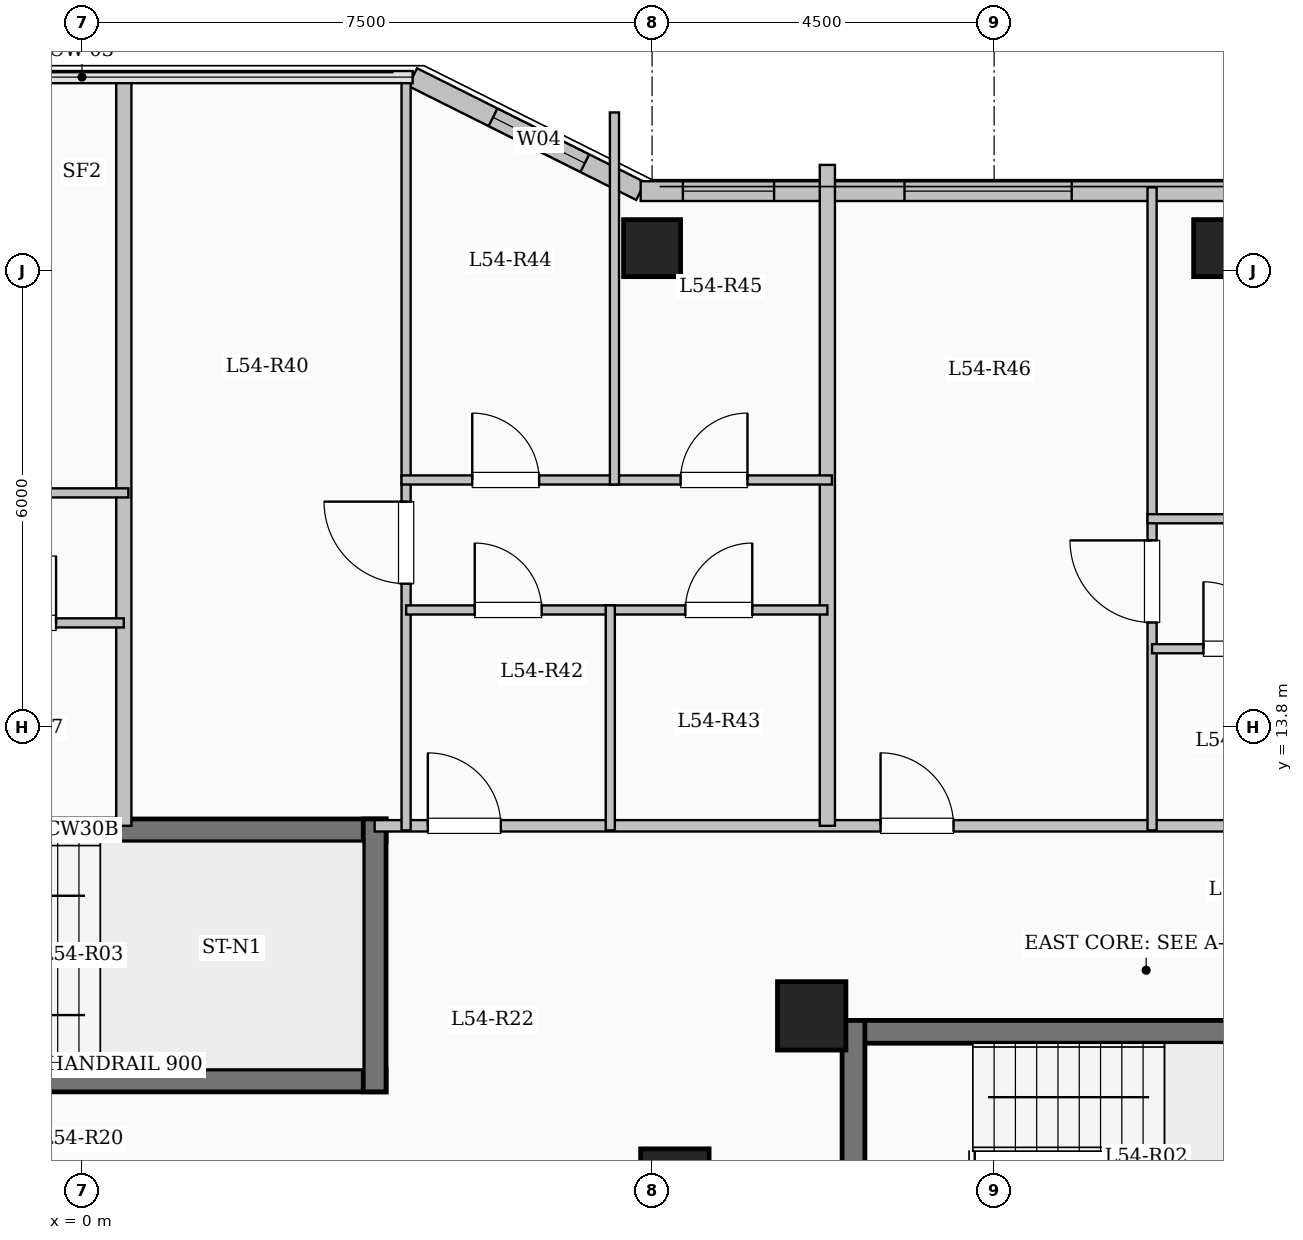
"""IFC4 building model, lengths in metres.
Left out: names, types, materials, properties, quantities, classifications, styles, units other than length and angle.
Written with IfcOpenShell. Run it as: python <this file> out.ifc"""

import sys

from ifc_helpers import new_model, si_unit, direction, frame, frame_2d, origin, origin_2d, place, context, subcontext, project, spatial, rectangle, extrude, element, fill, save


model = new_model("IFC4")
c1 = context("Model", 3, precision=1e-05, world=origin(), true_north=direction((0.0, 1.0)))
c2 = subcontext(c1, "Body", "Model", "MODEL_VIEW")
j1 = project(units=[si_unit("LENGTHUNIT", "METRE"), si_unit("PLANEANGLEUNIT", "RADIAN")], contexts=[c1])
p1 = place(None, origin())
s1 = spatial("IfcSite", under=j1, at=p1, CompositionType="ELEMENT")
p2 = place(p1, origin())
s2 = spatial("IfcBuilding", under=s1, at=p2, CompositionType="ELEMENT")
p3 = place(p2, frame((0.0, 0.0, 200.3)))
s3 = spatial("IfcBuildingStorey", under=s2, at=p3, CompositionType="ELEMENT", Elevation=200.3)
for number, where, z_axis, x_axis in (
    (1, (7.8, 7.8, 0.0), (0.0, 0.0, 1.0), (1.0, 0.0, 0.0)),
    (2, (9.6, 10.0, 0.0), (0.0, 0.0, 1.0), (1.0, 0.0, 0.0)),
):
    element("IfcColumn", number, at=place(p3, frame(where, z_axis=z_axis, x_axis=x_axis)), inside=s3, PredefinedType="COLUMN", context=c2, shape_type="SweptSolid", body=[
        extrude(rectangle(XDim=0.9, YDim=0.9, at=origin_2d()), origin(), (0.0, 0.0, 1.0), 3.35),
    ])
for number, where, z_axis, x_axis in (
    (3, (7.5, 20.1, 0.0), (0.0, 0.0, 1.0), (1.0, 0.0, 0.0)),
    (4, (15.0, 20.1, 0.0), (0.0, 0.0, 1.0), (1.0, 0.0, 0.0)),
):
    element("IfcColumn", number, at=place(p3, frame(where, z_axis=z_axis, x_axis=x_axis)), inside=s3, PredefinedType="COLUMN", context=c2, shape_type="SweptSolid", body=[
        extrude(rectangle(XDim=0.75, YDim=0.75, at=origin_2d()), origin(), (0.0, 0.0, 1.0), 3.35),
    ])
p4 = place(p3, frame((4.35, 22.35, 0.0), z_axis=(0.0, 0.0, 1.0), x_axis=(0.894427191, -0.4472135955, 0.0)))
e5 = element("IfcWall", 5, at=p4, inside=s3, PredefinedType="SOLIDWALL", context=c2, shape_type="SweptSolid", body=[
    extrude(rectangle(XDim=3.354, YDim=0.26, at=frame_2d((1.677, 0.0))), origin(), (0.0, 0.0, 1.0), 3.1),
])
p5 = place(p4, frame((1.182, 0.0, 0.95)))
e6 = element("IfcOpeningElement", 6, at=p5, cuts=e5, PredefinedType="OPENING", context=c2, shape_type="SweptSolid", body=[
    extrude(rectangle(XDim=1.35, YDim=1.55, at=frame_2d((0.675, 0.775))), frame((0.0, 0.14, 0.0), z_axis=(0.0, -1.0, 0.0), x_axis=(1.0, 0.0, 0.0)), (0.0, 0.0, 1.0), 0.28),
])
p6 = place(p3, frame((7.35, 20.85, 0.0), z_axis=(0.0, 0.0, 1.0), x_axis=(1.0, 0.0, 0.0)))
e7 = element("IfcWall", 7, at=p6, inside=s3, PredefinedType="SOLIDWALL", context=c2, shape_type="SweptSolid", body=[
    extrude(rectangle(XDim=11.1, YDim=0.26, at=frame_2d((5.55, 0.0))), origin(), (0.0, 0.0, 1.0), 3.1),
])
p7 = place(p6, frame((0.555, 0.0, 0.95)))
e8 = element("IfcOpeningElement", 8, at=p7, cuts=e7, PredefinedType="OPENING", context=c2, shape_type="SweptSolid", body=[
    extrude(rectangle(XDim=1.2, YDim=1.5, at=frame_2d((0.6, 0.75))), frame((0.0, 0.14, 0.0), z_axis=(0.0, -1.0, 0.0), x_axis=(1.0, 0.0, 0.0)), (0.0, 0.0, 1.0), 0.28),
])
p8 = place(p6, frame((3.471, 0.0, 0.9)))
e9 = element("IfcOpeningElement", 9, at=p8, cuts=e7, PredefinedType="OPENING", context=c2, shape_type="SweptSolid", body=[
    extrude(rectangle(XDim=2.2, YDim=1.75, at=frame_2d((1.1, 0.875))), frame((0.0, 0.14, 0.0), z_axis=(0.0, -1.0, 0.0), x_axis=(1.0, 0.0, 0.0)), (0.0, 0.0, 1.0), 0.28),
])
p9 = place(p6, frame((8.04, 0.0, 0.9)))
e10 = element("IfcOpeningElement", 10, at=p9, cuts=e7, PredefinedType="OPENING", context=c2, shape_type="SweptSolid", body=[
    extrude(rectangle(XDim=1.65, YDim=1.6, at=frame_2d((0.825, 0.8))), frame((0.0, 0.14, 0.0), z_axis=(0.0, -1.0, 0.0), x_axis=(1.0, 0.0, 0.0)), (0.0, 0.0, 1.0), 0.28),
])
p10 = place(p3, frame((10.0, 9.79, 0.0), z_axis=(0.0, 0.0, 1.0), x_axis=(1.0, 0.0, 0.0)))
e11 = element("IfcWall", 11, at=p10, inside=s3, PredefinedType="SHEAR", context=c2, shape_type="SweptSolid", body=[
    extrude(rectangle(XDim=8.0, YDim=0.3, at=frame_2d((4.0, 0.0))), origin(), (0.0, 0.0, 1.0), 3.35),
])
p11 = place(p3, frame((10.15, 6.35, 0.0), z_axis=(0.0, 0.0, 1.0), x_axis=(0.0, 1.0, 0.0)))
e12 = element("IfcWall", 12, at=p11, inside=s3, PredefinedType="SHEAR", context=c2, shape_type="SweptSolid", body=[
    extrude(rectangle(XDim=3.59, YDim=0.3, at=frame_2d((1.795, 0.0))), origin(), (0.0, 0.0, 1.0), 3.35),
])
p12 = place(p3, frame((-4.0, 12.44, 0.0), z_axis=(0.0, 0.0, 1.0), x_axis=(1.0, 0.0, 0.0)))
e13 = element("IfcWall", 13, at=p12, inside=s3, PredefinedType="SHEAR", context=c2, shape_type="SweptSolid", body=[
    extrude(rectangle(XDim=8.0, YDim=0.3, at=frame_2d((4.0, 0.0))), origin(), (0.0, 0.0, 1.0), 3.35),
])
p13 = place(p3, frame((-4.0, 9.15, 0.0), z_axis=(0.0, 0.0, 1.0), x_axis=(1.0, 0.0, 0.0)))
e14 = element("IfcWall", 14, at=p13, inside=s3, PredefinedType="SHEAR", context=c2, shape_type="SweptSolid", body=[
    extrude(rectangle(XDim=8.0, YDim=0.3, at=frame_2d((4.0, 0.0))), origin(), (0.0, 0.0, 1.0), 3.35),
])
p14 = place(p13, frame((0.55, 0.0, 0.0)))
e15 = element("IfcOpeningElement", 15, at=p14, cuts=e14, PredefinedType="OPENING", context=c2, shape_type="SweptSolid", body=[
    extrude(rectangle(XDim=1.0, YDim=2.15, at=frame_2d((0.5, 1.075))), frame((0.0, 0.16, 0.0), z_axis=(0.0, -1.0, 0.0), x_axis=(1.0, 0.0, 0.0)), (0.0, 0.0, 1.0), 0.32),
])
p15 = place(p3, frame((3.85, 9.0, 0.0), z_axis=(0.0, 0.0, 1.0), x_axis=(0.0, 1.0, 0.0)))
e16 = element("IfcWall", 16, at=p15, inside=s3, PredefinedType="SHEAR", context=c2, shape_type="SweptSolid", body=[
    extrude(rectangle(XDim=3.59, YDim=0.3, at=frame_2d((1.795, 0.0))), origin(), (0.0, 0.0, 1.0), 3.35),
])
p16 = place(p3, frame((3.85, 12.5, 0.0), z_axis=(0.0, 0.0, 1.0), x_axis=(1.0, 0.0, 0.0)))
e17 = element("IfcWall", 17, at=p16, inside=s3, PredefinedType="PARTITIONING", context=c2, shape_type="SweptSolid", body=[
    extrude(rectangle(XDim=14.5, YDim=0.15, at=frame_2d((7.25, 0.0))), origin(), (0.0, 0.0, 1.0), 3.1),
])
p17 = place(p16, frame((0.7, 0.0, 0.0)))
e18 = element("IfcOpeningElement", 18, at=p17, cuts=e17, PredefinedType="OPENING", context=c2, shape_type="SweptSolid", body=[
    extrude(rectangle(XDim=0.96, YDim=2.15, at=frame_2d((0.48, 1.075))), frame((0.0, 0.085, 0.0), z_axis=(0.0, -1.0, 0.0), x_axis=(1.0, 0.0, 0.0)), (0.0, 0.0, 1.0), 0.17),
])
p18 = place(p16, frame((6.656, 0.0, 0.0)))
e19 = element("IfcOpeningElement", 19, at=p18, cuts=e17, PredefinedType="OPENING", context=c2, shape_type="SweptSolid", body=[
    extrude(rectangle(XDim=0.96, YDim=2.15, at=frame_2d((0.48, 1.075))), frame((0.0, 0.085, 0.0), z_axis=(0.0, -1.0, 0.0), x_axis=(1.0, 0.0, 0.0)), (0.0, 0.0, 1.0), 0.17),
])
p19 = place(p3, frame((0.55, 12.5, 0.0), z_axis=(0.0, 0.0, 1.0), x_axis=(0.0, 1.0, 0.0)))
e20 = element("IfcWall", 20, at=p19, inside=s3, PredefinedType="SOLIDWALL", context=c2, shape_type="SweptSolid", body=[
    extrude(rectangle(XDim=9.88, YDim=0.2, at=frame_2d((4.94, 0.0))), origin(), (0.0, 0.0, 1.0), 3.1),
])
p20 = place(p3, frame((-2.112, 15.17, 0.0), z_axis=(0.0, 0.0, 1.0), x_axis=(1.0, 0.0, 0.0)))
e21 = element("IfcWall", 21, at=p20, inside=s3, PredefinedType="PARTITIONING", context=c2, shape_type="SweptSolid", body=[
    extrude(rectangle(XDim=2.662, YDim=0.12, at=frame_2d((1.331, 0.0))), origin(), (0.0, 0.0, 1.0), 3.1),
])
p21 = place(p20, frame((0.891, 0.0, 0.0)))
e22 = element("IfcOpeningElement", 22, at=p21, cuts=e21, PredefinedType="OPENING", context=c2, shape_type="SweptSolid", body=[
    extrude(rectangle(XDim=0.88, YDim=2.1, at=frame_2d((0.44, 1.05))), frame((0.0, 0.07, 0.0), z_axis=(0.0, -1.0, 0.0), x_axis=(1.0, 0.0, 0.0)), (0.0, 0.0, 1.0), 0.14),
])
p22 = place(p3, frame((-5.622, 16.88, 0.0), z_axis=(0.0, 0.0, 1.0), x_axis=(1.0, 0.0, 0.0)))
e23 = element("IfcWall", 23, at=p22, inside=s3, PredefinedType="PARTITIONING", context=c2, shape_type="SweptSolid", body=[
    extrude(rectangle(XDim=6.232, YDim=0.12, at=frame_2d((3.116, 0.0))), origin(), (0.0, 0.0, 1.0), 2.725),
])
p23 = place(p22, frame((1.073, 0.0, 0.0)))
e24 = element("IfcOpeningElement", 24, at=p23, cuts=e23, PredefinedType="OPENING", context=c2, shape_type="SweptSolid", body=[
    extrude(rectangle(XDim=0.88, YDim=2.1, at=frame_2d((0.44, 1.05))), frame((0.0, 0.07, 0.0), z_axis=(0.0, -1.0, 0.0), x_axis=(1.0, 0.0, 0.0)), (0.0, 0.0, 1.0), 0.14),
])
p24 = place(p22, frame((4.099, 0.0, 0.0)))
e25 = element("IfcOpeningElement", 25, at=p24, cuts=e23, PredefinedType="OPENING", context=c2, shape_type="SweptSolid", body=[
    extrude(rectangle(XDim=0.88, YDim=2.1, at=frame_2d((0.44, 1.05))), frame((0.0, 0.07, 0.0), z_axis=(0.0, -1.0, 0.0), x_axis=(1.0, 0.0, 0.0)), (0.0, 0.0, 1.0), 0.14),
])
p25 = place(p3, frame((9.806, 12.5, 0.0), z_axis=(0.0, 0.0, 1.0), x_axis=(0.0, 1.0, 0.0)))
e26 = element("IfcWall", 26, at=p25, inside=s3, PredefinedType="SOLIDWALL", context=c2, shape_type="SweptSolid", body=[
    extrude(rectangle(XDim=8.695, YDim=0.2, at=frame_2d((4.348, 0.0))), origin(), (0.0, 0.0, 1.0), 3.1),
])
p26 = place(p3, frame((4.264, 12.44, 0.0), z_axis=(0.0, 0.0, 1.0), x_axis=(0.0, 1.0, 0.0)))
e27 = element("IfcWall", 27, at=p26, inside=s3, PredefinedType="PARTITIONING", context=c2, shape_type="SweptSolid", body=[
    extrude(rectangle(XDim=9.94, YDim=0.12, at=frame_2d((4.97, 0.0))), origin(), (0.0, 0.0, 1.0), 3.1),
])
p27 = place(p26, frame((3.245, 0.0, 0.0)))
e28 = element("IfcOpeningElement", 28, at=p27, cuts=e27, PredefinedType="OPENING", context=c2, shape_type="SweptSolid", body=[
    extrude(rectangle(XDim=1.08, YDim=2.15, at=frame_2d((0.54, 1.075))), frame((0.0, 0.07, 0.0), z_axis=(0.0, -1.0, 0.0), x_axis=(1.0, 0.0, 0.0)), (0.0, 0.0, 1.0), 0.14),
])
p28 = place(p3, frame((4.264, 15.34, 0.0), z_axis=(0.0, 0.0, 1.0), x_axis=(1.0, 0.0, 0.0)))
e29 = element("IfcWall", 29, at=p28, inside=s3, PredefinedType="PARTITIONING", context=c2, shape_type="SweptSolid", body=[
    extrude(rectangle(XDim=2.686, YDim=0.12, at=frame_2d((1.343, 0.0))), origin(), (0.0, 0.0, 1.0), 2.725),
])
p29 = place(p28, frame((0.903, 0.0, 0.0)))
e30 = element("IfcOpeningElement", 30, at=p29, cuts=e29, PredefinedType="OPENING", context=c2, shape_type="SweptSolid", body=[
    extrude(rectangle(XDim=0.88, YDim=2.1, at=frame_2d((0.44, 1.05))), frame((0.0, 0.07, 0.0), z_axis=(0.0, -1.0, 0.0), x_axis=(1.0, 0.0, 0.0)), (0.0, 0.0, 1.0), 0.14),
])
p30 = place(p3, frame((6.95, 15.34, 0.0), z_axis=(0.0, 0.0, 1.0), x_axis=(1.0, 0.0, 0.0)))
e31 = element("IfcWall", 31, at=p30, inside=s3, PredefinedType="PARTITIONING", context=c2, shape_type="SweptSolid", body=[
    extrude(rectangle(XDim=2.856, YDim=0.12, at=frame_2d((1.428, 0.0))), origin(), (0.0, 0.0, 1.0), 2.725),
])
p31 = place(p30, frame((0.988, 0.0, 0.0)))
e32 = element("IfcOpeningElement", 32, at=p31, cuts=e31, PredefinedType="OPENING", context=c2, shape_type="SweptSolid", body=[
    extrude(rectangle(XDim=0.88, YDim=2.1, at=frame_2d((0.44, 1.05))), frame((0.0, 0.07, 0.0), z_axis=(0.0, -1.0, 0.0), x_axis=(1.0, 0.0, 0.0)), (0.0, 0.0, 1.0), 0.14),
])
p32 = place(p3, frame((4.204, 17.05, 0.0), z_axis=(0.0, 0.0, 1.0), x_axis=(1.0, 0.0, 0.0)))
e33 = element("IfcWall", 33, at=p32, inside=s3, PredefinedType="PARTITIONING", context=c2, shape_type="SweptSolid", body=[
    extrude(rectangle(XDim=5.662, YDim=0.12, at=frame_2d((2.831, 0.0))), origin(), (0.0, 0.0, 1.0), 2.725),
])
p33 = place(p32, frame((0.93, 0.0, 0.0)))
e34 = element("IfcOpeningElement", 34, at=p33, cuts=e33, PredefinedType="OPENING", context=c2, shape_type="SweptSolid", body=[
    extrude(rectangle(XDim=0.88, YDim=2.1, at=frame_2d((0.44, 1.05))), frame((0.0, 0.07, 0.0), z_axis=(0.0, -1.0, 0.0), x_axis=(1.0, 0.0, 0.0)), (0.0, 0.0, 1.0), 0.14),
])
p34 = place(p32, frame((3.671, 0.0, 0.0)))
e35 = element("IfcOpeningElement", 35, at=p34, cuts=e33, PredefinedType="OPENING", context=c2, shape_type="SweptSolid", body=[
    extrude(rectangle(XDim=0.88, YDim=2.1, at=frame_2d((0.44, 1.05))), frame((0.0, 0.07, 0.0), z_axis=(0.0, -1.0, 0.0), x_axis=(1.0, 0.0, 0.0)), (0.0, 0.0, 1.0), 0.14),
])
p35 = place(p3, frame((6.95, 12.44, 0.0), z_axis=(0.0, 0.0, 1.0), x_axis=(0.0, 1.0, 0.0)))
e36 = element("IfcWall", 36, at=p35, inside=s3, PredefinedType="PARTITIONING", context=c2, shape_type="SweptSolid", body=[
    extrude(rectangle(XDim=2.96, YDim=0.12, at=frame_2d((1.48, 0.0))), origin(), (0.0, 0.0, 1.0), 3.1),
])
p36 = place(p3, frame((7.005, 16.99, 0.0), z_axis=(0.0, 0.0, 1.0), x_axis=(0.0, 1.0, 0.0)))
e37 = element("IfcWall", 37, at=p36, inside=s3, PredefinedType="PARTITIONING", context=c2, shape_type="SweptSolid", body=[
    extrude(rectangle(XDim=4.895, YDim=0.12, at=frame_2d((2.448, 0.0))), origin(), (0.0, 0.0, 1.0), 3.1),
])
p37 = place(p3, frame((14.078, 12.44, 0.0), z_axis=(0.0, 0.0, 1.0), x_axis=(0.0, 1.0, 0.0)))
e38 = element("IfcWall", 38, at=p37, inside=s3, PredefinedType="PARTITIONING", context=c2, shape_type="SweptSolid", body=[
    extrude(rectangle(XDim=8.46, YDim=0.12, at=frame_2d((4.23, 0.0))), origin(), (0.0, 0.0, 1.0), 3.1),
])
p38 = place(p37, frame((2.735, 0.0, 0.0)))
e39 = element("IfcOpeningElement", 39, at=p38, cuts=e38, PredefinedType="OPENING", context=c2, shape_type="SweptSolid", body=[
    extrude(rectangle(XDim=1.08, YDim=2.15, at=frame_2d((0.54, 1.075))), frame((0.0, 0.07, 0.0), z_axis=(0.0, -1.0, 0.0), x_axis=(1.0, 0.0, 0.0)), (0.0, 0.0, 1.0), 0.14),
])
p39 = place(p3, frame((14.078, 14.83, 0.0), z_axis=(0.0, 0.0, 1.0), x_axis=(1.0, 0.0, 0.0)))
e40 = element("IfcWall", 40, at=p39, inside=s3, PredefinedType="PARTITIONING", context=c2, shape_type="SweptSolid", body=[
    extrude(rectangle(XDim=2.232, YDim=0.12, at=frame_2d((1.116, 0.0))), origin(), (0.0, 0.0, 1.0), 3.1),
])
p40 = place(p39, frame((0.676, 0.0, 0.0)))
e41 = element("IfcOpeningElement", 41, at=p40, cuts=e40, PredefinedType="OPENING", context=c2, shape_type="SweptSolid", body=[
    extrude(rectangle(XDim=0.88, YDim=2.1, at=frame_2d((0.44, 1.05))), frame((0.0, 0.07, 0.0), z_axis=(0.0, -1.0, 0.0), x_axis=(1.0, 0.0, 0.0)), (0.0, 0.0, 1.0), 0.14),
])
p41 = place(p3, frame((14.018, 16.54, 0.0), z_axis=(0.0, 0.0, 1.0), x_axis=(1.0, 0.0, 0.0)))
e42 = element("IfcWall", 42, at=p41, inside=s3, PredefinedType="PARTITIONING", context=c2, shape_type="SweptSolid", body=[
    extrude(rectangle(XDim=4.392, YDim=0.12, at=frame_2d((2.196, 0.0))), origin(), (0.0, 0.0, 1.0), 3.1),
])
p42 = place(p41, frame((1.666, 0.0, 0.0)))
e43 = element("IfcOpeningElement", 43, at=p42, cuts=e42, PredefinedType="OPENING", context=c2, shape_type="SweptSolid", body=[
    extrude(rectangle(XDim=0.88, YDim=2.1, at=frame_2d((0.44, 1.05))), frame((0.0, 0.07, 0.0), z_axis=(0.0, -1.0, 0.0), x_axis=(1.0, 0.0, 0.0)), (0.0, 0.0, 1.0), 0.14),
])
p43 = place(p5, origin())
e44 = element("IfcWindow", 44, at=p43, inside=s3, PartitioningType="SINGLE_PANEL", PredefinedType="WINDOW", context=c2, shape_type="SweptSolid", body=[
    extrude(rectangle(XDim=1.35, YDim=1.55, at=frame_2d((0.675, 0.775))), frame((0.0, 0.03, 0.0), z_axis=(0.0, -1.0, 0.0), x_axis=(1.0, 0.0, 0.0)), (0.0, 0.0, 1.0), 0.06),
])
fill(e6, e44)
p44 = place(p7, origin())
e45 = element("IfcWindow", 45, at=p44, inside=s3, PartitioningType="SINGLE_PANEL", PredefinedType="WINDOW", context=c2, shape_type="SweptSolid", body=[
    extrude(rectangle(XDim=1.2, YDim=1.5, at=frame_2d((0.6, 0.75))), frame((0.0, 0.03, 0.0), z_axis=(0.0, -1.0, 0.0), x_axis=(1.0, 0.0, 0.0)), (0.0, 0.0, 1.0), 0.06),
])
fill(e8, e45)
p45 = place(p8, origin())
e46 = element("IfcWindow", 46, at=p45, inside=s3, PartitioningType="SINGLE_PANEL", PredefinedType="WINDOW", context=c2, shape_type="SweptSolid", body=[
    extrude(rectangle(XDim=2.2, YDim=1.75, at=frame_2d((1.1, 0.875))), frame((0.0, 0.03, 0.0), z_axis=(0.0, -1.0, 0.0), x_axis=(1.0, 0.0, 0.0)), (0.0, 0.0, 1.0), 0.06),
])
fill(e9, e46)
p46 = place(p21, origin())
e47 = element("IfcDoor", 47, at=p46, inside=s3, OperationType="SINGLE_SWING_RIGHT", PredefinedType="DOOR", context=c2, shape_type="SweptSolid", body=[
    extrude(rectangle(XDim=0.88, YDim=2.1, at=frame_2d((0.44, 1.05))), frame((0.0, 0.025, 0.0), z_axis=(0.0, -1.0, 0.0), x_axis=(1.0, 0.0, 0.0)), (0.0, 0.0, 1.0), 0.05),
])
fill(e22, e47)
p47 = place(p17, origin())
e48 = element("IfcDoor", 48, at=p47, inside=s3, OperationType="SINGLE_SWING_LEFT", PredefinedType="DOOR", context=c2, shape_type="SweptSolid", body=[
    extrude(rectangle(XDim=0.96, YDim=2.15, at=frame_2d((0.48, 1.075))), frame((0.0, 0.025, 0.0), z_axis=(0.0, -1.0, 0.0), x_axis=(1.0, 0.0, 0.0)), (0.0, 0.0, 1.0), 0.05),
])
fill(e18, e48)
p48 = place(p27, origin())
e49 = element("IfcDoor", 49, at=p48, inside=s3, OperationType="SINGLE_SWING_RIGHT", PredefinedType="DOOR", context=c2, shape_type="SweptSolid", body=[
    extrude(rectangle(XDim=1.08, YDim=2.15, at=frame_2d((0.54, 1.075))), frame((0.0, 0.025, 0.0), z_axis=(0.0, -1.0, 0.0), x_axis=(1.0, 0.0, 0.0)), (0.0, 0.0, 1.0), 0.05),
])
fill(e28, e49)
p49 = place(p29, origin())
e50 = element("IfcDoor", 50, at=p49, inside=s3, OperationType="SINGLE_SWING_LEFT", PredefinedType="DOOR", context=c2, shape_type="SweptSolid", body=[
    extrude(rectangle(XDim=0.88, YDim=2.1, at=frame_2d((0.44, 1.05))), frame((0.0, 0.025, 0.0), z_axis=(0.0, -1.0, 0.0), x_axis=(1.0, 0.0, 0.0)), (0.0, 0.0, 1.0), 0.05),
])
fill(e30, e50)
p50 = place(p31, origin())
e51 = element("IfcDoor", 51, at=p50, inside=s3, OperationType="SINGLE_SWING_RIGHT", PredefinedType="DOOR", context=c2, shape_type="SweptSolid", body=[
    extrude(rectangle(XDim=0.88, YDim=2.1, at=frame_2d((0.44, 1.05))), frame((0.0, 0.025, 0.0), z_axis=(0.0, -1.0, 0.0), x_axis=(1.0, 0.0, 0.0)), (0.0, 0.0, 1.0), 0.05),
])
fill(e32, e51)
p51 = place(p33, origin())
e52 = element("IfcDoor", 52, at=p51, inside=s3, OperationType="SINGLE_SWING_LEFT", PredefinedType="DOOR", context=c2, shape_type="SweptSolid", body=[
    extrude(rectangle(XDim=0.88, YDim=2.1, at=frame_2d((0.44, 1.05))), frame((0.0, 0.025, 0.0), z_axis=(0.0, -1.0, 0.0), x_axis=(1.0, 0.0, 0.0)), (0.0, 0.0, 1.0), 0.05),
])
fill(e34, e52)
p52 = place(p34, origin())
e53 = element("IfcDoor", 53, at=p52, inside=s3, OperationType="SINGLE_SWING_RIGHT", PredefinedType="DOOR", context=c2, shape_type="SweptSolid", body=[
    extrude(rectangle(XDim=0.88, YDim=2.1, at=frame_2d((0.44, 1.05))), frame((0.0, 0.025, 0.0), z_axis=(0.0, -1.0, 0.0), x_axis=(1.0, 0.0, 0.0)), (0.0, 0.0, 1.0), 0.05),
])
fill(e35, e53)
p53 = place(p18, origin())
e54 = element("IfcDoor", 54, at=p53, inside=s3, OperationType="SINGLE_SWING_LEFT", PredefinedType="DOOR", context=c2, shape_type="SweptSolid", body=[
    extrude(rectangle(XDim=0.96, YDim=2.15, at=frame_2d((0.48, 1.075))), frame((0.0, 0.025, 0.0), z_axis=(0.0, -1.0, 0.0), x_axis=(1.0, 0.0, 0.0)), (0.0, 0.0, 1.0), 0.05),
])
fill(e19, e54)
p54 = place(p38, origin())
e55 = element("IfcDoor", 55, at=p54, inside=s3, OperationType="SINGLE_SWING_RIGHT", PredefinedType="DOOR", context=c2, shape_type="SweptSolid", body=[
    extrude(rectangle(XDim=1.08, YDim=2.15, at=frame_2d((0.54, 1.075))), frame((0.0, 0.025, 0.0), z_axis=(0.0, -1.0, 0.0), x_axis=(1.0, 0.0, 0.0)), (0.0, 0.0, 1.0), 0.05),
])
fill(e39, e55)
p55 = place(p40, origin())
e56 = element("IfcDoor", 56, at=p55, inside=s3, OperationType="SINGLE_SWING_LEFT", PredefinedType="DOOR", context=c2, shape_type="SweptSolid", body=[
    extrude(rectangle(XDim=0.88, YDim=2.1, at=frame_2d((0.44, 1.05))), frame((0.0, 0.025, 0.0), z_axis=(0.0, -1.0, 0.0), x_axis=(1.0, 0.0, 0.0)), (0.0, 0.0, 1.0), 0.05),
])
fill(e41, e56)
save(model, sys.argv[1])
